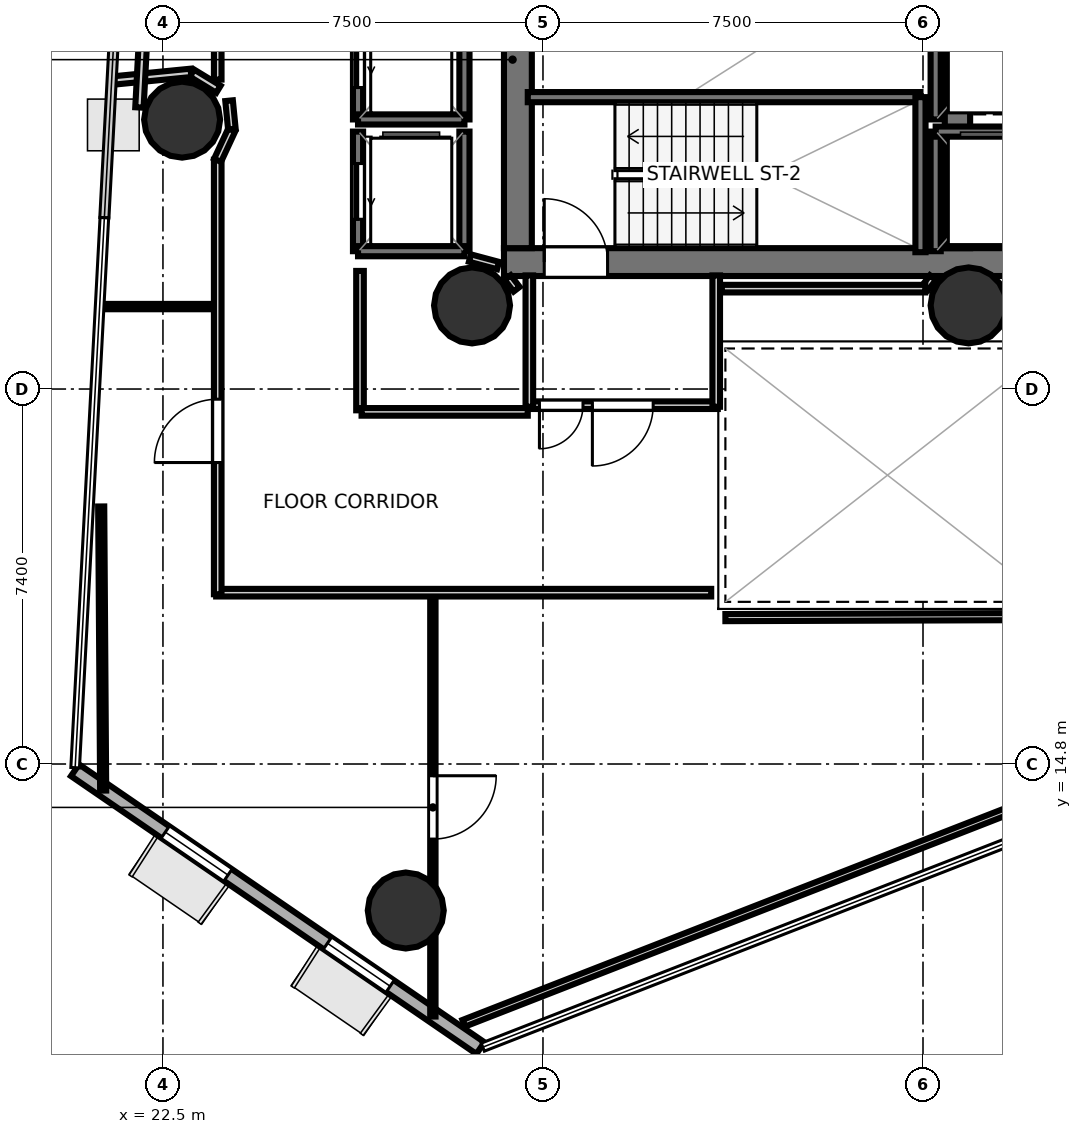
"""IFC4 building model, lengths in metres.
Left out: names, types, materials, properties, quantities, classifications, styles, units other than length and angle.
Written with IfcOpenShell. Run it as: python <this file> out.ifc"""

import sys

from ifc_helpers import new_model, si_unit, direction, frame, frame_2d, origin, origin_2d, place, context, subcontext, project, spatial, rectangle, hollow_circle, extrude, element, fill, save


model = new_model("IFC4")
c1 = context("Model", 3, precision=1e-05, world=origin(), true_north=direction((0.0, 1.0)))
c2 = subcontext(c1, "Body", "Model", "MODEL_VIEW")
j1 = project(units=[si_unit("LENGTHUNIT", "METRE"), si_unit("PLANEANGLEUNIT", "RADIAN")], contexts=[c1])
p1 = place(None, origin())
s1 = spatial("IfcSite", under=j1, at=p1, CompositionType="ELEMENT")
p2 = place(p1, origin())
s2 = spatial("IfcBuilding", under=s1, at=p2, CompositionType="ELEMENT")
p3 = place(p2, frame((0.0, 0.0, 131.1)))
s3 = spatial("IfcBuildingStorey", under=s2, at=p3, CompositionType="ELEMENT", Elevation=131.1)
p4 = place(p3, frame((29.23, 24.705, 0.0), z_axis=(0.0, 0.0, 1.0), x_axis=(1.0, 0.0, 0.0)))
e1 = element("IfcWall", 1, at=p4, inside=s3, PredefinedType="SHEAR", context=c2, shape_type="SweptSolid", body=[
    extrude(rectangle(XDim=10.62, YDim=0.55, at=frame_2d((5.31, 0.0))), origin(), (0.0, 0.0, 1.0), 3.52),
])
p5 = place(p4, frame((0.795, 0.0, 0.0)))
e2 = element("IfcOpeningElement", 2, at=p5, cuts=e1, PredefinedType="OPENING", context=c2, shape_type="SweptSolid", body=[
    extrude(rectangle(XDim=1.25, YDim=2.15, at=frame_2d((0.625, 1.075))), frame((0.0, 0.285, 0.0), z_axis=(0.0, -1.0, 0.0), x_axis=(1.0, 0.0, 0.0)), (0.0, 0.0, 1.0), 0.57),
])
p6 = place(p3, frame((29.505, 24.98, 0.0), z_axis=(0.0, 0.0, 1.0), x_axis=(0.0, 1.0, 0.0)))
e3 = element("IfcWall", 3, at=p6, inside=s3, PredefinedType="SHEAR", context=c2, shape_type="SweptSolid", body=[
    extrude(rectangle(XDim=7.44, YDim=0.55, at=frame_2d((3.72, 0.0))), origin(), (0.0, 0.0, 1.0), 3.52),
])
p7 = place(p3, frame((38.18, 24.98, 0.0), z_axis=(0.0, 0.0, 1.0), x_axis=(0.0, 1.0, 0.0)))
e4 = element("IfcWall", 4, at=p7, inside=s3, PredefinedType="SHEAR", context=c2, shape_type="SweptSolid", body=[
    extrude(rectangle(XDim=7.44, YDim=0.5, at=frame_2d((3.72, 0.0))), origin(), (0.0, 0.0, 1.0), 3.52),
])
for number, where, z_axis, x_axis in (
    (5, (28.6, 23.85, 0.0), (0.0, 0.0, 1.0), (1.0, 0.0, 0.0)),
    (6, (38.4, 23.85, 0.0), (0.0, 0.0, 1.0), (1.0, 0.0, 0.0)),
    (7, (22.878, 27.516, 0.0), (0.0, 0.0, 1.0), (1.0, 0.0, 0.0)),
    (8, (27.292, 11.909, 0.0), (0.0, 0.0, 1.0), (1.0, 0.0, 0.0)),
):
    element("IfcColumn", number, at=place(p3, frame(where, z_axis=z_axis, x_axis=x_axis)), inside=s3, PredefinedType="COLUMN", context=c2, shape_type="SweptSolid", body=[
        extrude(hollow_circle(Radius=0.75, WallThickness=0.036, at=origin_2d()), origin(), (0.0, 0.0, 1.0), 3.7),
    ])
p8 = place(p3, frame((20.764, 14.677, 0.0), z_axis=(0.0, 0.0, 1.0), x_axis=(0.824860645318, -0.565336108705, 0.0)))
e9 = element("IfcWall", 9, at=p8, inside=s3, PredefinedType="SOLIDWALL", context=c2, shape_type="SweptSolid", body=[
    extrude(rectangle(XDim=9.7, YDim=0.28, at=frame_2d((4.85, 0.0))), origin(), (0.0, 0.0, 1.0), 3.52),
])
p9 = place(p8, frame((2.16, 0.0, 0.85)))
e10 = element("IfcOpeningElement", 10, at=p9, cuts=e9, PredefinedType="OPENING", context=c2, shape_type="SweptSolid", body=[
    extrude(rectangle(XDim=1.5, YDim=2.1, at=frame_2d((0.75, 1.05))), frame((0.0, 0.15, 0.0), z_axis=(0.0, -1.0, 0.0), x_axis=(1.0, 0.0, 0.0)), (0.0, 0.0, 1.0), 0.3),
])
p10 = place(p8, frame((6.04, 0.0, 0.85)))
e11 = element("IfcOpeningElement", 11, at=p10, cuts=e9, PredefinedType="OPENING", context=c2, shape_type="SweptSolid", body=[
    extrude(rectangle(XDim=1.5, YDim=2.1, at=frame_2d((0.75, 1.05))), frame((0.0, 0.15, 0.0), z_axis=(0.0, -1.0, 0.0), x_axis=(1.0, 0.0, 0.0)), (0.0, 0.0, 1.0), 0.3),
])
p11 = place(p3, frame((29.7, 27.96, 0.0), z_axis=(0.0, 0.0, 1.0), x_axis=(1.0, 0.0, 0.0)))
e12 = element("IfcWall", 12, at=p11, inside=s3, PredefinedType="SOLIDWALL", context=c2, shape_type="SweptSolid", body=[
    extrude(rectangle(XDim=7.75, YDim=0.2, at=frame_2d((3.875, 0.0))), origin(), (0.0, 0.0, 1.0), 3.52),
])
p12 = place(p3, frame((37.45, 24.9, 0.0), z_axis=(0.0, 0.0, 1.0), x_axis=(0.0, 1.0, 0.0)))
e13 = element("IfcWall", 13, at=p12, inside=s3, PredefinedType="SOLIDWALL", context=c2, shape_type="SweptSolid", body=[
    extrude(rectangle(XDim=3.06, YDim=0.2, at=frame_2d((1.53, 0.0))), origin(), (0.0, 0.0, 1.0), 3.52),
])
p13 = place(p3, frame((37.75, 24.92, 0.0), z_axis=(0.0, 0.0, 1.0), x_axis=(0.0, 1.0, 0.0)))
e14 = element("IfcWall", 14, at=p13, inside=s3, PredefinedType="SOLIDWALL", context=c2, shape_type="SweptSolid", body=[
    extrude(rectangle(XDim=2.36, YDim=0.2, at=frame_2d((1.18, 0.0))), origin(), (0.0, 0.0, 1.0), 3.52),
])
p14 = place(p3, frame((37.75, 27.28, 0.0), z_axis=(0.0, 0.0, 1.0), x_axis=(1.0, 0.0, 0.0)))
e15 = element("IfcWall", 15, at=p14, inside=s3, PredefinedType="SOLIDWALL", context=c2, shape_type="SweptSolid", body=[
    extrude(rectangle(XDim=2.1, YDim=0.2, at=frame_2d((1.05, 0.0))), origin(), (0.0, 0.0, 1.0), 3.52),
])
p15 = place(p3, frame((28.45, 27.52, 0.0), z_axis=(0.0, 0.0, 1.0), x_axis=(0.0, 1.0, 0.0)))
e16 = element("IfcWall", 16, at=p15, inside=s3, PredefinedType="SOLIDWALL", context=c2, shape_type="SweptSolid", body=[
    extrude(rectangle(XDim=2.36, YDim=0.2, at=frame_2d((1.18, 0.0))), origin(), (0.0, 0.0, 1.0), 3.52),
])
p16 = place(p3, frame((26.35, 27.52, 0.0), z_axis=(0.0, 0.0, 1.0), x_axis=(0.0, 1.0, 0.0)))
e17 = element("IfcWall", 17, at=p16, inside=s3, PredefinedType="SOLIDWALL", context=c2, shape_type="SweptSolid", body=[
    extrude(rectangle(XDim=2.36, YDim=0.2, at=frame_2d((1.18, 0.0))), origin(), (0.0, 0.0, 1.0), 3.52),
])
p17 = place(p16, frame((0.63, 0.0, 0.0)))
e18 = element("IfcOpeningElement", 18, at=p17, cuts=e17, PredefinedType="OPENING", context=c2, shape_type="SweptSolid", body=[
    extrude(rectangle(XDim=1.1, YDim=2.15, at=frame_2d((0.55, 1.075))), frame((0.0, 0.11, 0.0), z_axis=(0.0, -1.0, 0.0), x_axis=(1.0, 0.0, 0.0)), (0.0, 0.0, 1.0), 0.22),
])
p18 = place(p3, frame((26.35, 27.52, 0.0), z_axis=(0.0, 0.0, 1.0), x_axis=(1.0, 0.0, 0.0)))
e19 = element("IfcWall", 19, at=p18, inside=s3, PredefinedType="SOLIDWALL", context=c2, shape_type="SweptSolid", body=[
    extrude(rectangle(XDim=2.1, YDim=0.2, at=frame_2d((1.05, 0.0))), origin(), (0.0, 0.0, 1.0), 3.52),
])
p19 = place(p3, frame((28.45, 24.92, 0.0), z_axis=(0.0, 0.0, 1.0), x_axis=(0.0, 1.0, 0.0)))
e20 = element("IfcWall", 20, at=p19, inside=s3, PredefinedType="SOLIDWALL", context=c2, shape_type="SweptSolid", body=[
    extrude(rectangle(XDim=2.36, YDim=0.2, at=frame_2d((1.18, 0.0))), origin(), (0.0, 0.0, 1.0), 3.52),
])
p20 = place(p3, frame((26.35, 24.92, 0.0), z_axis=(0.0, 0.0, 1.0), x_axis=(0.0, 1.0, 0.0)))
e21 = element("IfcWall", 21, at=p20, inside=s3, PredefinedType="SOLIDWALL", context=c2, shape_type="SweptSolid", body=[
    extrude(rectangle(XDim=2.36, YDim=0.2, at=frame_2d((1.18, 0.0))), origin(), (0.0, 0.0, 1.0), 3.52),
])
p21 = place(p20, frame((0.63, 0.0, 0.0)))
e22 = element("IfcOpeningElement", 22, at=p21, cuts=e21, PredefinedType="OPENING", context=c2, shape_type="SweptSolid", body=[
    extrude(rectangle(XDim=1.1, YDim=2.15, at=frame_2d((0.55, 1.075))), frame((0.0, 0.11, 0.0), z_axis=(0.0, -1.0, 0.0), x_axis=(1.0, 0.0, 0.0)), (0.0, 0.0, 1.0), 0.22),
])
p22 = place(p3, frame((26.35, 24.92, 0.0), z_axis=(0.0, 0.0, 1.0), x_axis=(1.0, 0.0, 0.0)))
e23 = element("IfcWall", 23, at=p22, inside=s3, PredefinedType="SOLIDWALL", context=c2, shape_type="SweptSolid", body=[
    extrude(rectangle(XDim=2.1, YDim=0.2, at=frame_2d((1.05, 0.0))), origin(), (0.0, 0.0, 1.0), 3.52),
])
p23 = place(p3, frame((37.75, 27.52, 0.0), z_axis=(0.0, 0.0, 1.0), x_axis=(0.0, 1.0, 0.0)))
e24 = element("IfcWall", 24, at=p23, inside=s3, PredefinedType="SOLIDWALL", context=c2, shape_type="SweptSolid", body=[
    extrude(rectangle(XDim=2.36, YDim=0.2, at=frame_2d((1.18, 0.0))), origin(), (0.0, 0.0, 1.0), 3.52),
])
p24 = place(p3, frame((33.45, 21.881, 0.0), z_axis=(0.0, 0.0, 1.0), x_axis=(-1.0, 0.0, 0.0)))
e25 = element("IfcWall", 25, at=p24, inside=s3, PredefinedType="PARTITIONING", context=c2, shape_type="SweptSolid", body=[
    extrude(rectangle(XDim=3.75, YDim=0.15, at=frame_2d((1.875, 0.0))), origin(), (0.0, 0.0, 1.0), 2.84),
])
p25 = place(p24, frame((1.275, 0.0, 0.0)))
e26 = element("IfcOpeningElement", 26, at=p25, cuts=e25, PredefinedType="OPENING", context=c2, shape_type="SweptSolid", body=[
    extrude(rectangle(XDim=1.2, YDim=2.15, at=frame_2d((0.6, 1.075))), frame((0.0, 0.085, 0.0), z_axis=(0.0, -1.0, 0.0), x_axis=(1.0, 0.0, 0.0)), (0.0, 0.0, 1.0), 0.17),
])
p26 = place(p24, frame((2.66, 0.0, 0.0)))
e27 = element("IfcOpeningElement", 27, at=p26, cuts=e25, PredefinedType="OPENING", context=c2, shape_type="SweptSolid", body=[
    extrude(rectangle(XDim=0.86, YDim=2.05, at=frame_2d((0.43, 1.025))), frame((0.0, 0.085, 0.0), z_axis=(0.0, -1.0, 0.0), x_axis=(1.0, 0.0, 0.0)), (0.0, 0.0, 1.0), 0.17),
])
for number, where, z_axis, x_axis in (
    (28, (29.731, 21.85, 0.0), (0.0, 0.0, 1.0), (0.0, 1.0, 0.0)),
    (29, (33.419, 24.442, 0.0), (0.0, 0.0, 1.0), (0.0, -1.0, 0.0)),
):
    element("IfcWall", number, at=place(p3, frame(where, z_axis=z_axis, x_axis=x_axis)), inside=s3, PredefinedType="PARTITIONING", context=c2, shape_type="SweptSolid", body=[
        extrude(rectangle(XDim=2.592, YDim=0.15, at=frame_2d((1.296, 0.0))), origin(), (0.0, 0.0, 1.0), 2.84),
    ])
p27 = place(p3, frame((29.48, 24.169, 0.0), z_axis=(0.0, 0.0, 1.0), x_axis=(-0.608043045279, 0.79390405912, 0.0)))
e30 = element("IfcWall", 30, at=p27, inside=s3, PredefinedType="PARTITIONING", context=c2, shape_type="SweptSolid", body=[
    extrude(rectangle(XDim=0.29, YDim=0.15, at=frame_2d((0.145, 0.0))), origin(), (0.0, 0.0, 1.0), 2.84),
])
p28 = place(p3, frame((29.114, 24.637, 0.0), z_axis=(0.0, 0.0, 1.0), x_axis=(-0.966199685486, 0.257794817183, 0.0)))
e31 = element("IfcWall", 31, at=p28, inside=s3, PredefinedType="PARTITIONING", context=c2, shape_type="SweptSolid", body=[
    extrude(rectangle(XDim=0.575, YDim=0.15, at=frame_2d((0.288, 0.0))), origin(), (0.0, 0.0, 1.0), 2.84),
])
p29 = place(p3, frame((37.697, 24.399, 0.0), z_axis=(0.0, 0.0, 1.0), x_axis=(-0.60763139403, -0.794219169367, 0.0)))
e32 = element("IfcWall", 32, at=p29, inside=s3, PredefinedType="PARTITIONING", context=c2, shape_type="SweptSolid", body=[
    extrude(rectangle(XDim=0.25, YDim=0.15, at=frame_2d((0.125, 0.0))), origin(), (0.0, 0.0, 1.0), 2.84),
])
p30 = place(p3, frame((37.545, 24.181, 0.0), z_axis=(0.0, 0.0, 1.0), x_axis=(-1.0, 0.0, 0.0)))
e33 = element("IfcWall", 33, at=p30, inside=s3, PredefinedType="PARTITIONING", context=c2, shape_type="SweptSolid", body=[
    extrude(rectangle(XDim=4.015, YDim=0.15, at=frame_2d((2.007, 0.0))), origin(), (0.0, 0.0, 1.0), 2.84),
])
p31 = place(p3, frame((23.581, 28.307, 0.0), z_axis=(0.0, 0.0, 1.0), x_axis=(0.0, 1.0, 0.0)))
e34 = element("IfcWall", 34, at=p31, inside=s3, PredefinedType="PARTITIONING", context=c2, shape_type="SweptSolid", body=[
    extrude(rectangle(XDim=11.567, YDim=0.15, at=frame_2d((5.783, 0.0))), origin(), (0.0, 0.0, 1.0), 2.84),
])
p32 = place(p31, frame((7.369, 0.0, 0.0)))
e35 = element("IfcOpeningElement", 35, at=p32, cuts=e34, PredefinedType="OPENING", context=c2, shape_type="SweptSolid", body=[
    extrude(rectangle(XDim=0.9, YDim=2.1, at=frame_2d((0.45, 1.05))), frame((0.0, 0.085, 0.0), z_axis=(0.0, -1.0, 0.0), x_axis=(1.0, 0.0, 0.0)), (0.0, 0.0, 1.0), 0.17),
])
p33 = place(p31, frame((2.446, 0.0, 0.0)))
e36 = element("IfcOpeningElement", 36, at=p33, cuts=e34, PredefinedType="OPENING", context=c2, shape_type="SweptSolid", body=[
    extrude(rectangle(XDim=0.9, YDim=2.1, at=frame_2d((0.45, 1.05))), frame((0.0, 0.085, 0.0), z_axis=(0.0, -1.0, 0.0), x_axis=(1.0, 0.0, 0.0)), (0.0, 0.0, 1.0), 0.17),
])
p34 = place(p3, frame((26.389, 24.531, 0.0), z_axis=(0.0, 0.0, 1.0), x_axis=(0.0, -1.0, 0.0)))
e37 = element("IfcWall", 37, at=p34, inside=s3, PredefinedType="PARTITIONING", context=c2, shape_type="SweptSolid", body=[
    extrude(rectangle(XDim=2.75, YDim=0.15, at=frame_2d((1.375, 0.0))), origin(), (0.0, 0.0, 1.0), 2.84),
])
p35 = place(p3, frame((26.42, 21.749, 0.0), z_axis=(0.0, 0.0, 1.0), x_axis=(1.0, 0.0, 0.0)))
e38 = element("IfcWall", 38, at=p35, inside=s3, PredefinedType="PARTITIONING", context=c2, shape_type="SweptSolid", body=[
    extrude(rectangle(XDim=3.28, YDim=0.15, at=frame_2d((1.64, 0.0))), origin(), (0.0, 0.0, 1.0), 2.84),
])
p36 = place(p3, frame((33.32, 18.181, 0.0), z_axis=(0.0, 0.0, 1.0), x_axis=(-1.0, 0.0, 0.0)))
e39 = element("IfcWall", 39, at=p36, inside=s3, PredefinedType="PARTITIONING", context=c2, shape_type="SweptSolid", body=[
    extrude(rectangle(XDim=9.77, YDim=0.15, at=frame_2d((4.885, 0.0))), origin(), (0.0, 0.0, 1.0), 2.84),
])
p37 = place(p3, frame((23.581, 18.15, 0.0), z_axis=(0.0, 0.0, 1.0), x_axis=(0.0, 1.0, 0.0)))
e40 = element("IfcWall", 40, at=p37, inside=s3, PredefinedType="PARTITIONING", context=c2, shape_type="SweptSolid", body=[
    extrude(rectangle(XDim=8.575, YDim=0.15, at=frame_2d((4.288, 0.0))), origin(), (0.0, 0.0, 1.0), 2.84),
])
p38 = place(p37, frame((2.599, 0.0, 0.0)))
e41 = element("IfcOpeningElement", 41, at=p38, cuts=e40, PredefinedType="OPENING", context=c2, shape_type="SweptSolid", body=[
    extrude(rectangle(XDim=1.25, YDim=2.2, at=frame_2d((0.625, 1.1))), frame((0.0, 0.085, 0.0), z_axis=(0.0, -1.0, 0.0), x_axis=(1.0, 0.0, 0.0)), (0.0, 0.0, 1.0), 0.17),
])
p39 = place(p3, frame((23.578, 26.712, 0.0), z_axis=(0.0, 0.0, 1.0), x_axis=(0.421251946418, 0.906943657367, 0.0)))
e42 = element("IfcWall", 42, at=p39, inside=s3, PredefinedType="PARTITIONING", context=c2, shape_type="SweptSolid", body=[
    extrude(rectangle(XDim=0.663, YDim=0.15, at=frame_2d((0.332, 0.0))), origin(), (0.0, 0.0, 1.0), 2.84),
])
p40 = place(p3, frame((23.86, 27.33, 0.0), z_axis=(0.0, 0.0, 1.0), x_axis=(-0.098000919071, 0.995186324193, 0.0)))
e43 = element("IfcWall", 43, at=p40, inside=s3, PredefinedType="PARTITIONING", context=c2, shape_type="SweptSolid", body=[
    extrude(rectangle(XDim=0.563, YDim=0.15, at=frame_2d((0.281, 0.0))), origin(), (0.0, 0.0, 1.0), 2.84),
])
p41 = place(p3, frame((21.23, 23.827, 0.0), z_axis=(0.0, 0.0, 1.0), x_axis=(1.0, 0.0, 0.0)))
e44 = element("IfcWall", 44, at=p41, inside=s3, PredefinedType="PARTITIONING", context=c2, shape_type="SweptSolid", body=[
    extrude(rectangle(XDim=2.24, YDim=0.105, at=frame_2d((1.12, 0.0))), origin(), (0.0, 0.0, 1.0), 2.84),
])
p42 = place(p3, frame((27.827, 18.07, 0.0), z_axis=(0.0, 0.0, 1.0), x_axis=(0.0, -1.0, 0.0)))
e45 = element("IfcWall", 45, at=p42, inside=s3, PredefinedType="PARTITIONING", context=c2, shape_type="SweptSolid", body=[
    extrude(rectangle(XDim=8.253, YDim=0.105, at=frame_2d((4.126, 0.0))), origin(), (0.0, 0.0, 1.0), 2.84),
])
p43 = place(p42, frame((3.502, 0.0, 0.0)))
e46 = element("IfcOpeningElement", 46, at=p43, cuts=e45, PredefinedType="OPENING", context=c2, shape_type="SweptSolid", body=[
    extrude(rectangle(XDim=1.25, YDim=2.2, at=frame_2d((0.625, 1.1))), frame((0.0, 0.062, 0.0), z_axis=(0.0, -1.0, 0.0), x_axis=(1.0, 0.0, 0.0)), (0.0, 0.0, 1.0), 0.125),
])
p44 = place(p3, frame((21.32, 14.276, 0.0), z_axis=(0.0, 0.0, 1.0), x_axis=(-0.006923714897, 0.999976030799, 0.0)))
e47 = element("IfcWall", 47, at=p44, inside=s3, PredefinedType="PARTITIONING", context=c2, shape_type="SweptSolid", body=[
    extrude(rectangle(XDim=5.607, YDim=0.12, at=frame_2d((2.803, 0.0))), origin(), (0.0, 0.0, 1.0), 2.84),
])
p45 = place(p3, frame((57.7, 21.101, 0.0), z_axis=(0.0, 0.0, 1.0), x_axis=(-0.93160913768, -0.363461709939, 0.0)))
e48 = element("IfcWall", 48, at=p45, inside=s3, PredefinedType="PARTITIONING", context=c2, shape_type="SweptSolid", body=[
    extrude(rectangle(XDim=31.413, YDim=0.14, at=frame_2d((15.706, 0.0))), origin(), (0.0, 0.0, 1.0), 2.84),
])
p46 = place(p3, frame((33.6, 17.689, 0.0), z_axis=(0.0, 0.0, 1.0), x_axis=(0.99999467303, 0.003264033036, 0.0)))
e49 = element("IfcWall", 49, at=p46, inside=s3, PredefinedType="PARTITIONING", context=c2, shape_type="SweptSolid", body=[
    extrude(rectangle(XDim=6.507, YDim=0.14, at=frame_2d((3.254, 0.0))), origin(), (0.0, 0.0, 1.0), 2.84),
])
p47 = place(p3, frame((23.595, 28.116, 0.0), z_axis=(0.0, 0.0, 1.0), x_axis=(-0.853675286084, 0.520805631622, 0.0)))
e50 = element("IfcWall", 50, at=p47, inside=s3, PredefinedType="PLUMBINGWALL", context=c2, shape_type="SweptSolid", body=[
    extrude(rectangle(XDim=0.613, YDim=0.165, at=frame_2d((0.307, 0.0))), origin(), (0.0, 0.0, 1.0), 2.84),
])
p48 = place(p3, frame((23.052, 28.439, 0.0), z_axis=(0.0, 0.0, 1.0), x_axis=(-0.995177318494, -0.098092327712, 0.0)))
e51 = element("IfcWall", 51, at=p48, inside=s3, PredefinedType="PLUMBINGWALL", context=c2, shape_type="SweptSolid", body=[
    extrude(rectangle(XDim=1.593, YDim=0.165, at=frame_2d((0.796, 0.0))), origin(), (0.0, 0.0, 1.0), 2.84),
])
p49 = place(p3, frame((22.036, 27.756, 0.0), z_axis=(0.0, 0.0, 1.0), x_axis=(0.053022653613, 0.998593309713, 0.0)))
e52 = element("IfcWall", 52, at=p49, inside=s3, PredefinedType="PLUMBINGWALL", context=c2, shape_type="SweptSolid", body=[
    extrude(rectangle(XDim=5.608, YDim=0.165, at=frame_2d((2.804, 0.0))), origin(), (0.0, 0.0, 1.0), 2.84),
])
p50 = place(p5, origin())
e53 = element("IfcDoor", 53, at=p50, inside=s3, OperationType="SINGLE_SWING_LEFT", PredefinedType="DOOR", context=c2, shape_type="SweptSolid", body=[
    extrude(rectangle(XDim=1.25, YDim=2.15, at=frame_2d((0.625, 1.075))), frame((0.0, 0.025, 0.0), z_axis=(0.0, -1.0, 0.0), x_axis=(1.0, 0.0, 0.0)), (0.0, 0.0, 1.0), 0.05),
])
fill(e2, e53)
p51 = place(p17, origin())
e54 = element("IfcDoor", 54, at=p51, inside=s3, OperationType="SLIDING_TO_LEFT", PredefinedType="DOOR", context=c2, shape_type="SweptSolid", body=[
    extrude(rectangle(XDim=1.1, YDim=2.15, at=frame_2d((0.55, 1.075))), frame((0.0, 0.025, 0.0), z_axis=(0.0, -1.0, 0.0), x_axis=(1.0, 0.0, 0.0)), (0.0, 0.0, 1.0), 0.05),
])
fill(e18, e54)
p52 = place(p21, origin())
e55 = element("IfcDoor", 55, at=p52, inside=s3, OperationType="SLIDING_TO_LEFT", PredefinedType="DOOR", context=c2, shape_type="SweptSolid", body=[
    extrude(rectangle(XDim=1.1, YDim=2.15, at=frame_2d((0.55, 1.075))), frame((0.0, 0.025, 0.0), z_axis=(0.0, -1.0, 0.0), x_axis=(1.0, 0.0, 0.0)), (0.0, 0.0, 1.0), 0.05),
])
fill(e22, e55)
p53 = place(p25, origin())
e56 = element("IfcDoor", 56, at=p53, inside=s3, OperationType="SINGLE_SWING_RIGHT", PredefinedType="DOOR", context=c2, shape_type="SweptSolid", body=[
    extrude(rectangle(XDim=1.2, YDim=2.15, at=frame_2d((0.6, 1.075))), frame((0.0, 0.025, 0.0), z_axis=(0.0, -1.0, 0.0), x_axis=(1.0, 0.0, 0.0)), (0.0, 0.0, 1.0), 0.05),
])
fill(e26, e56)
p54 = place(p26, origin())
e57 = element("IfcDoor", 57, at=p54, inside=s3, OperationType="SINGLE_SWING_RIGHT", PredefinedType="DOOR", context=c2, shape_type="SweptSolid", body=[
    extrude(rectangle(XDim=0.86, YDim=2.05, at=frame_2d((0.43, 1.025))), frame((0.0, 0.025, 0.0), z_axis=(0.0, -1.0, 0.0), x_axis=(1.0, 0.0, 0.0)), (0.0, 0.0, 1.0), 0.05),
])
fill(e27, e57)
p55 = place(p38, origin())
e58 = element("IfcDoor", 58, at=p55, inside=s3, OperationType="SINGLE_SWING_LEFT", PredefinedType="DOOR", context=c2, shape_type="SweptSolid", body=[
    extrude(rectangle(XDim=1.25, YDim=2.2, at=frame_2d((0.625, 1.1))), frame((0.0, 0.025, 0.0), z_axis=(0.0, -1.0, 0.0), x_axis=(1.0, 0.0, 0.0)), (0.0, 0.0, 1.0), 0.05),
])
fill(e41, e58)
p56 = place(p43, origin())
e59 = element("IfcDoor", 59, at=p56, inside=s3, OperationType="SINGLE_SWING_LEFT", PredefinedType="DOOR", context=c2, shape_type="SweptSolid", body=[
    extrude(rectangle(XDim=1.25, YDim=2.2, at=frame_2d((0.625, 1.1))), frame((0.0, 0.025, 0.0), z_axis=(0.0, -1.0, 0.0), x_axis=(1.0, 0.0, 0.0)), (0.0, 0.0, 1.0), 0.05),
])
fill(e46, e59)
p57 = place(p9, origin())
e60 = element("IfcWindow", 60, at=p57, inside=s3, PartitioningType="SINGLE_PANEL", PredefinedType="WINDOW", context=c2, shape_type="SweptSolid", body=[
    extrude(rectangle(XDim=1.5, YDim=2.1, at=frame_2d((0.75, 1.05))), frame((0.0, 0.03, 0.0), z_axis=(0.0, -1.0, 0.0), x_axis=(1.0, 0.0, 0.0)), (0.0, 0.0, 1.0), 0.06),
])
fill(e10, e60)
p58 = place(p10, origin())
e61 = element("IfcWindow", 61, at=p58, inside=s3, PartitioningType="SINGLE_PANEL", PredefinedType="WINDOW", context=c2, shape_type="SweptSolid", body=[
    extrude(rectangle(XDim=1.5, YDim=2.1, at=frame_2d((0.75, 1.05))), frame((0.0, 0.03, 0.0), z_axis=(0.0, -1.0, 0.0), x_axis=(1.0, 0.0, 0.0)), (0.0, 0.0, 1.0), 0.06),
])
fill(e11, e61)
save(model, sys.argv[1])
